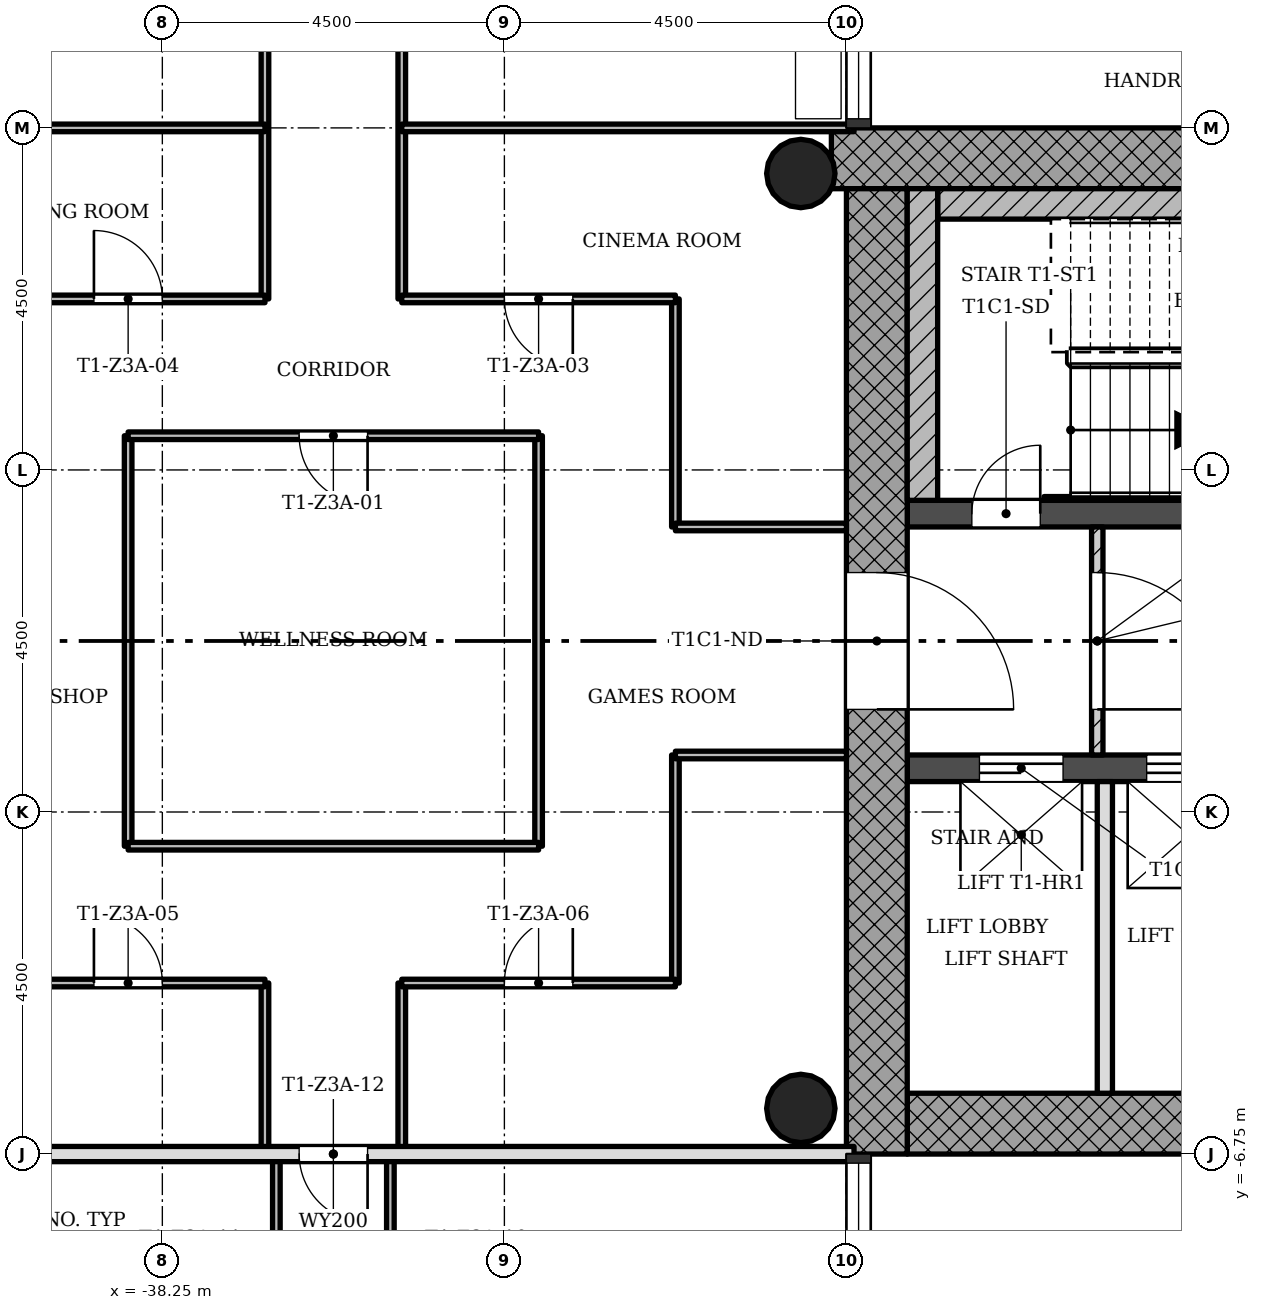
"""IFC4 building model, lengths in metres.
Left out: names, types, materials, properties, quantities, classifications, styles, units other than length and angle.
Written with IfcOpenShell. Run it as: python <this file> out.ifc"""

import sys

from ifc_helpers import new_model, si_unit, direction, frame, frame_2d, origin, origin_2d, place, context, subcontext, project, spatial, rectangle, hollow_circle, extrude, element, fill, save


model = new_model("IFC4")
c1 = context("Model", 3, precision=1e-05, world=origin(), true_north=direction((0.0, 1.0)))
c2 = subcontext(c1, "Body", "Model", "MODEL_VIEW")
j1 = project(units=[si_unit("LENGTHUNIT", "METRE"), si_unit("PLANEANGLEUNIT", "RADIAN")], contexts=[c1])
p1 = place(None, origin())
s1 = spatial("IfcSite", under=j1, at=p1, CompositionType="ELEMENT")
p2 = place(p1, origin())
s2 = spatial("IfcBuilding", under=s1, at=p2, CompositionType="ELEMENT")
p3 = place(p2, frame((0.0, 0.0, 137.1)))
s3 = spatial("IfcBuildingStorey", under=s2, at=p3, CompositionType="ELEMENT", Elevation=137.1)
p4 = place(p3, frame((-28.45, -6.35, 0.0), z_axis=(0.0, 0.0, 1.0), x_axis=(1.0, 0.0, 0.0)))
e1 = element("IfcWall", 1, at=p4, inside=s3, PredefinedType="SHEAR", context=c2, shape_type="SweptSolid", body=[
    extrude(rectangle(XDim=8.2, YDim=0.8, at=frame_2d((4.1, 0.0))), origin(), (0.0, 0.0, 1.0), 3.4),
])
p5 = place(p3, frame((-20.652, 6.35, 0.0), z_axis=(0.0, 0.0, 1.0), x_axis=(-1.0, 0.0, 0.0)))
e2 = element("IfcWall", 2, at=p5, inside=s3, PredefinedType="SHEAR", context=c2, shape_type="SweptSolid", body=[
    extrude(rectangle(XDim=8.796, YDim=0.8, at=frame_2d((4.398, 0.0))), origin(), (0.0, 0.0, 1.0), 3.4),
])
p6 = place(p3, frame((-28.85, 5.95, 0.0), z_axis=(0.0, 0.0, 1.0), x_axis=(0.0, -1.0, 0.0)))
e3 = element("IfcWall", 3, at=p6, inside=s3, PredefinedType="SHEAR", context=c2, shape_type="SweptSolid", body=[
    extrude(rectangle(XDim=12.7, YDim=0.8, at=frame_2d((6.35, 0.0))), origin(), (0.0, 0.0, 1.0), 3.4),
])
p7 = place(p6, frame((5.05, 0.0, 0.0)))
e4 = element("IfcOpeningElement", 4, at=p7, cuts=e3, PredefinedType="OPENING", context=c2, shape_type="SweptSolid", body=[
    extrude(rectangle(XDim=1.8, YDim=2.1, at=frame_2d((0.9, 1.05))), frame((0.0, 0.41, 0.0), z_axis=(0.0, -1.0, 0.0), x_axis=(1.0, 0.0, 0.0)), (0.0, 0.0, 1.0), 0.82),
])
p8 = place(p3, frame((-28.45, -1.675, 0.0), z_axis=(0.0, 0.0, 1.0), x_axis=(1.0, 0.0, 0.0)))
e5 = element("IfcWall", 5, at=p8, inside=s3, PredefinedType="SHEAR", context=c2, shape_type="SweptSolid", body=[
    extrude(rectangle(XDim=7.4, YDim=0.35, at=frame_2d((3.7, 0.0))), origin(), (0.0, 0.0, 1.0), 3.4),
])
p9 = place(p8, frame((0.95, 0.0, 0.0)))
e6 = element("IfcOpeningElement", 6, at=p9, cuts=e5, PredefinedType="OPENING", context=c2, shape_type="SweptSolid", body=[
    extrude(rectangle(XDim=1.1, YDim=2.1, at=frame_2d((0.55, 1.05))), frame((0.0, 0.185, 0.0), z_axis=(0.0, -1.0, 0.0), x_axis=(1.0, 0.0, 0.0)), (0.0, 0.0, 1.0), 0.37),
])
p10 = place(p8, frame((3.15, 0.0, 0.0)))
e7 = element("IfcOpeningElement", 7, at=p10, cuts=e5, PredefinedType="OPENING", context=c2, shape_type="SweptSolid", body=[
    extrude(rectangle(XDim=1.1, YDim=2.1, at=frame_2d((0.55, 1.05))), frame((0.0, 0.185, 0.0), z_axis=(0.0, -1.0, 0.0), x_axis=(1.0, 0.0, 0.0)), (0.0, 0.0, 1.0), 0.37),
])
p11 = place(p8, frame((5.35, 0.0, 0.0)))
e8 = element("IfcOpeningElement", 8, at=p11, cuts=e5, PredefinedType="OPENING", context=c2, shape_type="SweptSolid", body=[
    extrude(rectangle(XDim=1.1, YDim=2.1, at=frame_2d((0.55, 1.05))), frame((0.0, 0.185, 0.0), z_axis=(0.0, -1.0, 0.0), x_axis=(1.0, 0.0, 0.0)), (0.0, 0.0, 1.0), 0.37),
])
p12 = place(p3, frame((-28.45, 1.675, 0.0), z_axis=(0.0, 0.0, 1.0), x_axis=(1.0, 0.0, 0.0)))
e9 = element("IfcWall", 9, at=p12, inside=s3, PredefinedType="SHEAR", context=c2, shape_type="SweptSolid", body=[
    extrude(rectangle(XDim=7.4, YDim=0.35, at=frame_2d((3.7, 0.0))), origin(), (0.0, 0.0, 1.0), 3.4),
])
p13 = place(p12, frame((0.85, 0.0, 0.0)))
e10 = element("IfcOpeningElement", 10, at=p13, cuts=e9, PredefinedType="OPENING", context=c2, shape_type="SweptSolid", body=[
    extrude(rectangle(XDim=0.9, YDim=2.1, at=frame_2d((0.45, 1.05))), frame((0.0, 0.185, 0.0), z_axis=(0.0, -1.0, 0.0), x_axis=(1.0, 0.0, 0.0)), (0.0, 0.0, 1.0), 0.37),
])
for number, where, z_axis, x_axis in (
    (11, (-29.85, -6.15, 0.0), (0.0, 0.0, 1.0), (1.0, 0.0, 0.0)),
    (12, (-29.85, 6.15, 0.0), (0.0, 0.0, 1.0), (1.0, 0.0, 0.0)),
):
    element("IfcColumn", number, at=place(p3, frame(where, z_axis=z_axis, x_axis=x_axis)), inside=s3, PredefinedType="COLUMN", context=c2, shape_type="SweptSolid", body=[
        extrude(hollow_circle(Radius=0.45, WallThickness=0.032, at=origin_2d()), origin(), (0.0, 0.0, 1.0), 3.4),
    ])
p14 = place(p3, frame((-25.95, -1.5, 0.0), z_axis=(0.0, 0.0, 1.0), x_axis=(0.0, 1.0, 0.0)))
e13 = element("IfcWall", 13, at=p14, inside=s3, PredefinedType="PARTITIONING", context=c2, shape_type="SweptSolid", body=[
    extrude(rectangle(XDim=3.0, YDim=0.15, at=frame_2d((1.5, 0.0))), origin(), (0.0, 0.0, 1.0), 3.0),
])
p15 = place(p14, frame((0.6, 0.0, 0.0)))
e14 = element("IfcOpeningElement", 14, at=p15, cuts=e13, PredefinedType="OPENING", context=c2, shape_type="SweptSolid", body=[
    extrude(rectangle(XDim=1.8, YDim=2.1, at=frame_2d((0.9, 1.05))), frame((0.0, 0.085, 0.0), z_axis=(0.0, -1.0, 0.0), x_axis=(1.0, 0.0, 0.0)), (0.0, 0.0, 1.0), 0.17),
])
p16 = place(p3, frame((-25.85, -5.95, 0.0), z_axis=(0.0, 0.0, 1.0), x_axis=(0.0, 1.0, 0.0)))
e15 = element("IfcWall", 15, at=p16, inside=s3, PredefinedType="SOLIDWALL", context=c2, shape_type="SweptSolid", body=[
    extrude(rectangle(XDim=4.1, YDim=0.2, at=frame_2d((2.05, 0.0))), origin(), (0.0, 0.0, 1.0), 3.0),
])
p17 = place(p3, frame((-38.7, -2.7, 0.0), z_axis=(0.0, 0.0, 1.0), x_axis=(0.0, 1.0, 0.0)))
e16 = element("IfcWall", 16, at=p17, inside=s3, PredefinedType="PARTITIONING", context=c2, shape_type="SweptSolid", body=[
    extrude(rectangle(XDim=5.4, YDim=0.1, at=frame_2d((2.7, 0.0))), origin(), (0.0, 0.0, 1.0), 3.0),
])
p18 = place(p3, frame((-36.9, -6.75, 0.0), z_axis=(0.0, 0.0, 1.0), x_axis=(0.0, 1.0, 0.0)))
e17 = element("IfcWall", 17, at=p18, inside=s3, PredefinedType="PARTITIONING", context=c2, shape_type="SweptSolid", body=[
    extrude(rectangle(XDim=2.25, YDim=0.1, at=frame_2d((1.125, 0.0))), origin(), (0.0, 0.0, 1.0), 3.0),
])
p19 = place(p3, frame((-36.9, 4.5, 0.0), z_axis=(0.0, 0.0, 1.0), x_axis=(0.0, 1.0, 0.0)))
e18 = element("IfcWall", 18, at=p19, inside=s3, PredefinedType="PARTITIONING", context=c2, shape_type="SweptSolid", body=[
    extrude(rectangle(XDim=6.75, YDim=0.1, at=frame_2d((3.375, 0.0))), origin(), (0.0, 0.0, 1.0), 3.0),
])
p20 = place(p19, frame((4.05, 0.0, 0.0)))
e19 = element("IfcOpeningElement", 19, at=p20, cuts=e18, PredefinedType="OPENING", context=c2, shape_type="SweptSolid", body=[
    extrude(rectangle(XDim=0.9, YDim=2.1, at=frame_2d((0.45, 1.05))), frame((0.0, 0.06, 0.0), z_axis=(0.0, -1.0, 0.0), x_axis=(1.0, 0.0, 0.0)), (0.0, 0.0, 1.0), 0.12),
])
p21 = place(p3, frame((-36.75, -11.25, 0.0), z_axis=(0.0, 0.0, 1.0), x_axis=(0.0, 1.0, 0.0)))
e20 = element("IfcWall", 20, at=p21, inside=s3, PredefinedType="PARTITIONING", context=c2, shape_type="SweptSolid", body=[
    extrude(rectangle(XDim=4.5, YDim=0.1, at=frame_2d((2.25, 0.0))), origin(), (0.0, 0.0, 1.0), 3.0),
])
p22 = place(p21, frame((1.8, 0.0, 0.0)))
e21 = element("IfcOpeningElement", 21, at=p22, cuts=e20, PredefinedType="OPENING", context=c2, shape_type="SweptSolid", body=[
    extrude(rectangle(XDim=0.9, YDim=2.1, at=frame_2d((0.45, 1.05))), frame((0.0, 0.06, 0.0), z_axis=(0.0, -1.0, 0.0), x_axis=(1.0, 0.0, 0.0)), (0.0, 0.0, 1.0), 0.12),
])
p23 = place(p3, frame((-35.25, -11.25, 0.0), z_axis=(0.0, 0.0, 1.0), x_axis=(0.0, 1.0, 0.0)))
e22 = element("IfcWall", 22, at=p23, inside=s3, PredefinedType="PARTITIONING", context=c2, shape_type="SweptSolid", body=[
    extrude(rectangle(XDim=4.5, YDim=0.1, at=frame_2d((2.25, 0.0))), origin(), (0.0, 0.0, 1.0), 3.0),
])
p24 = place(p23, frame((1.8, 0.0, 0.0)))
e23 = element("IfcOpeningElement", 23, at=p24, cuts=e22, PredefinedType="OPENING", context=c2, shape_type="SweptSolid", body=[
    extrude(rectangle(XDim=0.9, YDim=2.1, at=frame_2d((0.45, 1.05))), frame((0.0, 0.06, 0.0), z_axis=(0.0, -1.0, 0.0), x_axis=(1.0, 0.0, 0.0)), (0.0, 0.0, 1.0), 0.12),
])
p25 = place(p3, frame((-35.1, -6.75, 0.0), z_axis=(0.0, 0.0, 1.0), x_axis=(0.0, 1.0, 0.0)))
e24 = element("IfcWall", 24, at=p25, inside=s3, PredefinedType="PARTITIONING", context=c2, shape_type="SweptSolid", body=[
    extrude(rectangle(XDim=2.25, YDim=0.1, at=frame_2d((1.125, 0.0))), origin(), (0.0, 0.0, 1.0), 3.0),
])
p26 = place(p3, frame((-35.1, 4.5, 0.0), z_axis=(0.0, 0.0, 1.0), x_axis=(0.0, 1.0, 0.0)))
e25 = element("IfcWall", 25, at=p26, inside=s3, PredefinedType="PARTITIONING", context=c2, shape_type="SweptSolid", body=[
    extrude(rectangle(XDim=6.75, YDim=0.1, at=frame_2d((3.375, 0.0))), origin(), (0.0, 0.0, 1.0), 3.0),
])
p27 = place(p26, frame((4.05, 0.0, 0.0)))
e26 = element("IfcOpeningElement", 26, at=p27, cuts=e25, PredefinedType="OPENING", context=c2, shape_type="SweptSolid", body=[
    extrude(rectangle(XDim=0.9, YDim=2.1, at=frame_2d((0.45, 1.05))), frame((0.0, 0.06, 0.0), z_axis=(0.0, -1.0, 0.0), x_axis=(1.0, 0.0, 0.0)), (0.0, 0.0, 1.0), 0.12),
])
p28 = place(p3, frame((-33.3, -2.7, 0.0), z_axis=(0.0, 0.0, 1.0), x_axis=(0.0, 1.0, 0.0)))
e27 = element("IfcWall", 27, at=p28, inside=s3, PredefinedType="PARTITIONING", context=c2, shape_type="SweptSolid", body=[
    extrude(rectangle(XDim=5.4, YDim=0.1, at=frame_2d((2.7, 0.0))), origin(), (0.0, 0.0, 1.0), 3.0),
])
for number, where, z_axis, x_axis in (
    (28, (-31.5, -4.5, 0.0), (0.0, 0.0, 1.0), (0.0, 1.0, 0.0)),
    (29, (-31.5, 1.5, 0.0), (0.0, 0.0, 1.0), (0.0, 1.0, 0.0)),
):
    element("IfcWall", number, at=place(p3, frame(where, z_axis=z_axis, x_axis=x_axis)), inside=s3, PredefinedType="PARTITIONING", context=c2, shape_type="SweptSolid", body=[
        extrude(rectangle(XDim=3.0, YDim=0.1, at=frame_2d((1.5, 0.0))), origin(), (0.0, 0.0, 1.0), 3.0),
    ])
p29 = place(p3, frame((-42.85, -6.75, 0.0), z_axis=(0.0, 0.0, 1.0), x_axis=(1.0, 0.0, 0.0)))
e30 = element("IfcWall", 30, at=p29, inside=s3, PredefinedType="SOLIDWALL", context=c2, shape_type="SweptSolid", body=[
    extrude(rectangle(XDim=13.7, YDim=0.2, at=frame_2d((6.85, 0.0))), origin(), (0.0, 0.0, 1.0), 3.0),
])
p30 = place(p29, frame((6.4, 0.0, 0.0)))
e31 = element("IfcOpeningElement", 31, at=p30, cuts=e30, PredefinedType="OPENING", context=c2, shape_type="SweptSolid", body=[
    extrude(rectangle(XDim=0.9, YDim=2.1, at=frame_2d((0.45, 1.05))), frame((0.0, 0.11, 0.0), z_axis=(0.0, -1.0, 0.0), x_axis=(1.0, 0.0, 0.0)), (0.0, 0.0, 1.0), 0.22),
])
p31 = place(p3, frame((-40.5, -4.5, 0.0), z_axis=(0.0, 0.0, 1.0), x_axis=(1.0, 0.0, 0.0)))
e32 = element("IfcWall", 32, at=p31, inside=s3, PredefinedType="PARTITIONING", context=c2, shape_type="SweptSolid", body=[
    extrude(rectangle(XDim=3.6, YDim=0.1, at=frame_2d((1.8, 0.0))), origin(), (0.0, 0.0, 1.0), 3.0),
])
p32 = place(p31, frame((1.35, 0.0, 0.0)))
e33 = element("IfcOpeningElement", 33, at=p32, cuts=e32, PredefinedType="OPENING", context=c2, shape_type="SweptSolid", body=[
    extrude(rectangle(XDim=0.9, YDim=2.1, at=frame_2d((0.45, 1.05))), frame((0.0, 0.06, 0.0), z_axis=(0.0, -1.0, 0.0), x_axis=(1.0, 0.0, 0.0)), (0.0, 0.0, 1.0), 0.12),
])
p33 = place(p3, frame((-35.1, -4.5, 0.0), z_axis=(0.0, 0.0, 1.0), x_axis=(1.0, 0.0, 0.0)))
e34 = element("IfcWall", 34, at=p33, inside=s3, PredefinedType="PARTITIONING", context=c2, shape_type="SweptSolid", body=[
    extrude(rectangle(XDim=3.6, YDim=0.1, at=frame_2d((1.8, 0.0))), origin(), (0.0, 0.0, 1.0), 3.0),
])
p34 = place(p33, frame((1.35, 0.0, 0.0)))
e35 = element("IfcOpeningElement", 35, at=p34, cuts=e34, PredefinedType="OPENING", context=c2, shape_type="SweptSolid", body=[
    extrude(rectangle(XDim=0.9, YDim=2.1, at=frame_2d((0.45, 1.05))), frame((0.0, 0.06, 0.0), z_axis=(0.0, -1.0, 0.0), x_axis=(1.0, 0.0, 0.0)), (0.0, 0.0, 1.0), 0.12),
])
p35 = place(p3, frame((-38.7, -2.7, 0.0), z_axis=(0.0, 0.0, 1.0), x_axis=(1.0, 0.0, 0.0)))
e36 = element("IfcWall", 36, at=p35, inside=s3, PredefinedType="PARTITIONING", context=c2, shape_type="SweptSolid", body=[
    extrude(rectangle(XDim=5.4, YDim=0.1, at=frame_2d((2.7, 0.0))), origin(), (0.0, 0.0, 1.0), 3.0),
])
for number, where, z_axis, x_axis in (
    (37, (-31.5, -1.5, 0.0), (0.0, 0.0, 1.0), (1.0, 0.0, 0.0)),
    (38, (-31.5, 1.5, 0.0), (0.0, 0.0, 1.0), (1.0, 0.0, 0.0)),
):
    element("IfcWall", number, at=place(p3, frame(where, z_axis=z_axis, x_axis=x_axis)), inside=s3, PredefinedType="PARTITIONING", context=c2, shape_type="SweptSolid", body=[
        extrude(rectangle(XDim=2.25, YDim=0.1, at=frame_2d((1.125, 0.0))), origin(), (0.0, 0.0, 1.0), 3.0),
    ])
p36 = place(p3, frame((-38.7, 2.7, 0.0), z_axis=(0.0, 0.0, 1.0), x_axis=(1.0, 0.0, 0.0)))
e39 = element("IfcWall", 39, at=p36, inside=s3, PredefinedType="PARTITIONING", context=c2, shape_type="SweptSolid", body=[
    extrude(rectangle(XDim=5.4, YDim=0.1, at=frame_2d((2.7, 0.0))), origin(), (0.0, 0.0, 1.0), 3.0),
])
p37 = place(p36, frame((2.25, 0.0, 0.0)))
e40 = element("IfcOpeningElement", 40, at=p37, cuts=e39, PredefinedType="OPENING", context=c2, shape_type="SweptSolid", body=[
    extrude(rectangle(XDim=0.9, YDim=2.1, at=frame_2d((0.45, 1.05))), frame((0.0, 0.06, 0.0), z_axis=(0.0, -1.0, 0.0), x_axis=(1.0, 0.0, 0.0)), (0.0, 0.0, 1.0), 0.12),
])
p38 = place(p3, frame((-40.5, 4.5, 0.0), z_axis=(0.0, 0.0, 1.0), x_axis=(1.0, 0.0, 0.0)))
e41 = element("IfcWall", 41, at=p38, inside=s3, PredefinedType="PARTITIONING", context=c2, shape_type="SweptSolid", body=[
    extrude(rectangle(XDim=3.6, YDim=0.1, at=frame_2d((1.8, 0.0))), origin(), (0.0, 0.0, 1.0), 3.0),
])
p39 = place(p38, frame((1.35, 0.0, 0.0)))
e42 = element("IfcOpeningElement", 42, at=p39, cuts=e41, PredefinedType="OPENING", context=c2, shape_type="SweptSolid", body=[
    extrude(rectangle(XDim=0.9, YDim=2.1, at=frame_2d((0.45, 1.05))), frame((0.0, 0.06, 0.0), z_axis=(0.0, -1.0, 0.0), x_axis=(1.0, 0.0, 0.0)), (0.0, 0.0, 1.0), 0.12),
])
p40 = place(p3, frame((-35.1, 4.5, 0.0), z_axis=(0.0, 0.0, 1.0), x_axis=(1.0, 0.0, 0.0)))
e43 = element("IfcWall", 43, at=p40, inside=s3, PredefinedType="PARTITIONING", context=c2, shape_type="SweptSolid", body=[
    extrude(rectangle(XDim=3.6, YDim=0.1, at=frame_2d((1.8, 0.0))), origin(), (0.0, 0.0, 1.0), 3.0),
])
p41 = place(p40, frame((1.35, 0.0, 0.0)))
e44 = element("IfcOpeningElement", 44, at=p41, cuts=e43, PredefinedType="OPENING", context=c2, shape_type="SweptSolid", body=[
    extrude(rectangle(XDim=0.9, YDim=2.1, at=frame_2d((0.45, 1.05))), frame((0.0, 0.06, 0.0), z_axis=(0.0, -1.0, 0.0), x_axis=(1.0, 0.0, 0.0)), (0.0, 0.0, 1.0), 0.12),
])
for number, where, z_axis, x_axis in (
    (45, (-42.85, 6.75, 0.0), (0.0, 0.0, 1.0), (1.0, 0.0, 0.0)),
    (46, (-35.1, 6.75, 0.0), (0.0, 0.0, 1.0), (1.0, 0.0, 0.0)),
):
    element("IfcWall", number, at=place(p3, frame(where, z_axis=z_axis, x_axis=x_axis)), inside=s3, PredefinedType="PARTITIONING", context=c2, shape_type="SweptSolid", body=[
        extrude(rectangle(XDim=5.95, YDim=0.1, at=frame_2d((2.975, 0.0))), origin(), (0.0, 0.0, 1.0), 3.0),
    ])
p42 = place(p3, frame((-28.05, 5.75, 0.0), z_axis=(0.0, 0.0, 1.0), x_axis=(1.0, 0.0, 0.0)))
e47 = element("IfcWall", 47, at=p42, inside=s3, PredefinedType="SHEAR", context=c2, shape_type="SweptSolid", body=[
    extrude(rectangle(XDim=6.6, YDim=0.4, at=frame_2d((3.3, 0.0))), origin(), (0.0, 0.0, 1.0), 3.4),
])
p43 = place(p3, frame((-28.25, 1.85, 0.0), z_axis=(0.0, 0.0, 1.0), x_axis=(0.0, 1.0, 0.0)))
e48 = element("IfcWall", 48, at=p43, inside=s3, PredefinedType="SHEAR", context=c2, shape_type="SweptSolid", body=[
    extrude(rectangle(XDim=4.1, YDim=0.4, at=frame_2d((2.05, 0.0))), origin(), (0.0, 0.0, 1.0), 3.4),
])
p44 = place(p3, frame((-26.65, 1.875, 0.0), z_axis=(0.0, 0.0, 1.0), x_axis=(1.0, 0.0, 0.0)))
e49 = element("IfcWall", 49, at=p44, inside=s3, PredefinedType="SHEAR", context=c2, shape_type="SweptSolid", body=[
    extrude(rectangle(XDim=5.2, YDim=0.05, at=frame_2d((2.6, 0.0))), origin(), (0.0, 0.0, 1.0), 3.4),
])
p45 = place(p15, origin())
e50 = element("IfcDoor", 50, at=p45, inside=s3, OperationType="SINGLE_SWING_LEFT", PredefinedType="DOOR", context=c2, shape_type="SweptSolid", body=[
    extrude(rectangle(XDim=1.8, YDim=2.1, at=frame_2d((0.9, 1.05))), frame((0.0, 0.025, 0.0), z_axis=(0.0, -1.0, 0.0), x_axis=(1.0, 0.0, 0.0)), (0.0, 0.0, 1.0), 0.05),
])
fill(e14, e50)
p46 = place(p37, origin())
e51 = element("IfcDoor", 51, at=p46, inside=s3, OperationType="SINGLE_SWING_RIGHT", PredefinedType="DOOR", context=c2, shape_type="SweptSolid", body=[
    extrude(rectangle(XDim=0.9, YDim=2.1, at=frame_2d((0.45, 1.05))), frame((0.0, 0.025, 0.0), z_axis=(0.0, -1.0, 0.0), x_axis=(1.0, 0.0, 0.0)), (0.0, 0.0, 1.0), 0.05),
])
fill(e40, e51)
p47 = place(p41, origin())
e52 = element("IfcDoor", 52, at=p47, inside=s3, OperationType="SINGLE_SWING_RIGHT", PredefinedType="DOOR", context=c2, shape_type="SweptSolid", body=[
    extrude(rectangle(XDim=0.9, YDim=2.1, at=frame_2d((0.45, 1.05))), frame((0.0, 0.025, 0.0), z_axis=(0.0, -1.0, 0.0), x_axis=(1.0, 0.0, 0.0)), (0.0, 0.0, 1.0), 0.05),
])
fill(e44, e52)
p48 = place(p39, origin())
e53 = element("IfcDoor", 53, at=p48, inside=s3, OperationType="SINGLE_SWING_RIGHT", PredefinedType="DOOR", context=c2, shape_type="SweptSolid", body=[
    extrude(rectangle(XDim=0.9, YDim=2.1, at=frame_2d((0.45, 1.05))), frame((0.0, 0.025, 0.0), z_axis=(0.0, -1.0, 0.0), x_axis=(1.0, 0.0, 0.0)), (0.0, 0.0, 1.0), 0.05),
])
fill(e42, e53)
p49 = place(p32, origin())
e54 = element("IfcDoor", 54, at=p49, inside=s3, OperationType="SINGLE_SWING_RIGHT", PredefinedType="DOOR", context=c2, shape_type="SweptSolid", body=[
    extrude(rectangle(XDim=0.9, YDim=2.1, at=frame_2d((0.45, 1.05))), frame((0.0, 0.025, 0.0), z_axis=(0.0, -1.0, 0.0), x_axis=(1.0, 0.0, 0.0)), (0.0, 0.0, 1.0), 0.05),
])
fill(e33, e54)
p50 = place(p34, origin())
e55 = element("IfcDoor", 55, at=p50, inside=s3, OperationType="SINGLE_SWING_LEFT", PredefinedType="DOOR", context=c2, shape_type="SweptSolid", body=[
    extrude(rectangle(XDim=0.9, YDim=2.1, at=frame_2d((0.45, 1.05))), frame((0.0, 0.025, 0.0), z_axis=(0.0, -1.0, 0.0), x_axis=(1.0, 0.0, 0.0)), (0.0, 0.0, 1.0), 0.05),
])
fill(e35, e55)
p51 = place(p30, origin())
e56 = element("IfcDoor", 56, at=p51, inside=s3, OperationType="SINGLE_SWING_RIGHT", PredefinedType="DOOR", context=c2, shape_type="SweptSolid", body=[
    extrude(rectangle(XDim=0.9, YDim=2.1, at=frame_2d((0.45, 1.05))), frame((0.0, 0.025, 0.0), z_axis=(0.0, -1.0, 0.0), x_axis=(1.0, 0.0, 0.0)), (0.0, 0.0, 1.0), 0.05),
])
fill(e31, e56)
p52 = place(p13, origin())
e57 = element("IfcDoor", 57, at=p52, inside=s3, OperationType="SINGLE_SWING_LEFT", PredefinedType="DOOR", context=c2, shape_type="SweptSolid", body=[
    extrude(rectangle(XDim=0.9, YDim=2.1, at=frame_2d((0.45, 1.05))), frame((0.0, 0.025, 0.0), z_axis=(0.0, -1.0, 0.0), x_axis=(1.0, 0.0, 0.0)), (0.0, 0.0, 1.0), 0.05),
])
fill(e10, e57)
p53 = place(p9, origin())
e58 = element("IfcDoor", 58, at=p53, inside=s3, OperationType="SLIDING_TO_LEFT", PredefinedType="DOOR", context=c2, shape_type="SweptSolid", body=[
    extrude(rectangle(XDim=1.1, YDim=2.1, at=frame_2d((0.55, 1.05))), frame((0.0, 0.025, 0.0), z_axis=(0.0, -1.0, 0.0), x_axis=(1.0, 0.0, 0.0)), (0.0, 0.0, 1.0), 0.05),
])
fill(e6, e58)
p54 = place(p10, origin())
e59 = element("IfcDoor", 59, at=p54, inside=s3, OperationType="SLIDING_TO_LEFT", PredefinedType="DOOR", context=c2, shape_type="SweptSolid", body=[
    extrude(rectangle(XDim=1.1, YDim=2.1, at=frame_2d((0.55, 1.05))), frame((0.0, 0.025, 0.0), z_axis=(0.0, -1.0, 0.0), x_axis=(1.0, 0.0, 0.0)), (0.0, 0.0, 1.0), 0.05),
])
fill(e7, e59)
p55 = place(p7, origin())
e60 = element("IfcDoor", 60, at=p55, inside=s3, OperationType="SINGLE_SWING_LEFT", PredefinedType="DOOR", context=c2, shape_type="SweptSolid", body=[
    extrude(rectangle(XDim=1.8, YDim=2.1, at=frame_2d((0.9, 1.05))), frame((0.0, 0.025, 0.0), z_axis=(0.0, -1.0, 0.0), x_axis=(1.0, 0.0, 0.0)), (0.0, 0.0, 1.0), 0.05),
])
fill(e4, e60)
save(model, sys.argv[1])
